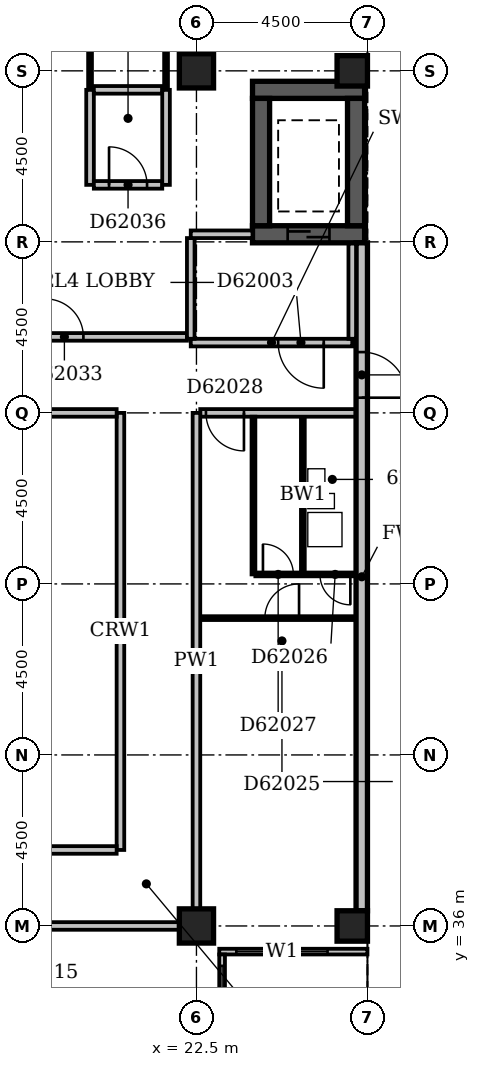
"""IFC4 building model, lengths in metres.
Left out: names, types, materials, properties, quantities, classifications, styles, units other than length and angle.
Written with IfcOpenShell. Run it as: python <this file> out.ifc"""

import sys

from ifc_helpers import new_model, si_unit, direction, frame, frame_2d, origin, origin_2d, place, context, subcontext, project, spatial, rectangle, extrude, element, fill, save


model = new_model("IFC4")
c1 = context("Model", 3, precision=1e-05, world=origin(), true_north=direction((0.0, 1.0)))
c2 = subcontext(c1, "Body", "Model", "MODEL_VIEW")
j1 = project(units=[si_unit("LENGTHUNIT", "METRE"), si_unit("PLANEANGLEUNIT", "RADIAN")], contexts=[c1])
p1 = place(None, origin())
s1 = spatial("IfcSite", under=j1, at=p1, CompositionType="ELEMENT")
p2 = place(p1, origin())
s2 = spatial("IfcBuilding", under=s1, at=p2, CompositionType="ELEMENT")
p3 = place(p2, frame((0.0, 0.0, 240.2)))
s3 = spatial("IfcBuildingStorey", under=s2, at=p3, CompositionType="ELEMENT", Elevation=240.2)
p4 = place(p3, frame((23.975, 54.2, -0.3), z_axis=(0.0, 0.0, 1.0), x_axis=(1.0, 0.0, 0.0)))
e1 = element("IfcWall", 1, at=p4, inside=s3, PredefinedType="SHEAR", context=c2, shape_type="SweptSolid", body=[
    extrude(rectangle(XDim=2.95, YDim=0.45, at=frame_2d((1.475, 0.0))), origin(), (0.0, 0.0, 1.0), 3.6),
])
p5 = place(p4, frame((0.925, 0.0, 0.3)))
e2 = element("IfcOpeningElement", 2, at=p5, cuts=e1, PredefinedType="OPENING", context=c2, shape_type="SweptSolid", body=[
    extrude(rectangle(XDim=1.1, YDim=2.1, at=frame_2d((0.55, 1.05))), frame((0.0, 0.237, 0.0), z_axis=(0.0, -1.0, 0.0), x_axis=(1.0, 0.0, 0.0)), (0.0, 0.0, 1.0), 0.474),
])
p6 = place(p3, frame((23.975, 58.0, -0.3), z_axis=(0.0, 0.0, 1.0), x_axis=(1.0, 0.0, 0.0)))
e3 = element("IfcWall", 3, at=p6, inside=s3, PredefinedType="SHEAR", context=c2, shape_type="SweptSolid", body=[
    extrude(rectangle(XDim=2.95, YDim=0.45, at=frame_2d((1.475, 0.0))), origin(), (0.0, 0.0, 1.0), 3.6),
])
for number, where, z_axis, x_axis in (
    (4, (24.2, 54.425, -0.3), (0.0, 0.0, 1.0), (0.0, 1.0, 0.0)),
    (5, (26.7, 54.425, -0.3), (0.0, 0.0, 1.0), (0.0, 1.0, 0.0)),
):
    element("IfcWall", number, at=place(p3, frame(where, z_axis=z_axis, x_axis=x_axis)), inside=s3, PredefinedType="SHEAR", context=c2, shape_type="SweptSolid", body=[
        extrude(rectangle(XDim=3.35, YDim=0.45, at=frame_2d((1.675, 0.0))), origin(), (0.0, 0.0, 1.0), 3.6),
    ])
p7 = place(p3, frame((22.5, 36.0, -0.3), z_axis=(0.0, 0.0, 1.0), x_axis=(1.0, 0.0, 0.0)))
e6 = element("IfcColumn", 6, at=p7, inside=s3, PredefinedType="COLUMN", context=c2, shape_type="SweptSolid", body=[
    extrude(rectangle(XDim=0.9, YDim=0.9, at=origin_2d()), origin(), (0.0, 0.0, 1.0), 3.6),
])
p8 = place(p3, frame((26.6, 36.0, -0.3), z_axis=(0.0, 0.0, 1.0), x_axis=(1.0, 0.0, 0.0)))
e7 = element("IfcColumn", 7, at=p8, inside=s3, PredefinedType="COLUMN", context=c2, shape_type="SweptSolid", body=[
    extrude(rectangle(XDim=0.8, YDim=0.8, at=origin_2d()), origin(), (0.0, 0.0, 1.0), 3.6),
])
p9 = place(p3, frame((22.5, 58.5, -0.3), z_axis=(0.0, 0.0, 1.0), x_axis=(1.0, 0.0, 0.0)))
e8 = element("IfcColumn", 8, at=p9, inside=s3, PredefinedType="COLUMN", context=c2, shape_type="SweptSolid", body=[
    extrude(rectangle(XDim=0.9, YDim=0.9, at=origin_2d()), origin(), (0.0, 0.0, 1.0), 3.6),
])
p10 = place(p3, frame((26.6, 58.5, -0.3), z_axis=(0.0, 0.0, 1.0), x_axis=(1.0, 0.0, 0.0)))
e9 = element("IfcColumn", 9, at=p10, inside=s3, PredefinedType="COLUMN", context=c2, shape_type="SweptSolid", body=[
    extrude(rectangle(XDim=0.8, YDim=0.8, at=origin_2d()), origin(), (0.0, 0.0, 1.0), 3.6),
])
p11 = place(p3, frame((23.175, 17.4, 0.0), z_axis=(0.0, 0.0, 1.0), x_axis=(0.0, 1.0, 0.0)))
e10 = element("IfcWall", 10, at=p11, inside=s3, PredefinedType="STANDARD", context=c2, shape_type="SweptSolid", body=[
    extrude(rectangle(XDim=17.85, YDim=0.15, at=frame_2d((8.925, 0.0))), origin(), (0.0, 0.0, 1.0), 2.7),
])
p12 = place(p11, frame((1.65, 0.0, 0.6)))
e11 = element("IfcOpeningElement", 11, at=p12, cuts=e10, PredefinedType="OPENING", context=c2, shape_type="SweptSolid", body=[
    extrude(rectangle(XDim=2.4, YDim=1.8, at=frame_2d((1.2, 0.9))), frame((0.0, 0.087, 0.0), z_axis=(0.0, -1.0, 0.0), x_axis=(1.0, 0.0, 0.0)), (0.0, 0.0, 1.0), 0.174),
])
p13 = place(p11, frame((7.936, 0.0, 0.6)))
e12 = element("IfcOpeningElement", 12, at=p13, cuts=e10, PredefinedType="OPENING", context=c2, shape_type="SweptSolid", body=[
    extrude(rectangle(XDim=0.9, YDim=1.8, at=frame_2d((0.45, 0.9))), frame((0.0, 0.087, 0.0), z_axis=(0.0, -1.0, 0.0), x_axis=(1.0, 0.0, 0.0)), (0.0, 0.0, 1.0), 0.174),
])
p14 = place(p11, frame((10.65, 0.0, 0.6)))
e13 = element("IfcOpeningElement", 13, at=p14, cuts=e10, PredefinedType="OPENING", context=c2, shape_type="SweptSolid", body=[
    extrude(rectangle(XDim=2.4, YDim=1.8, at=frame_2d((1.2, 0.9))), frame((0.0, 0.087, 0.0), z_axis=(0.0, -1.0, 0.0), x_axis=(1.0, 0.0, 0.0)), (0.0, 0.0, 1.0), 0.174),
])
p15 = place(p11, frame((15.15, 0.0, 0.6)))
e14 = element("IfcOpeningElement", 14, at=p15, cuts=e10, PredefinedType="OPENING", context=c2, shape_type="SweptSolid", body=[
    extrude(rectangle(XDim=2.4, YDim=1.8, at=frame_2d((1.2, 0.9))), frame((0.0, 0.087, 0.0), z_axis=(0.0, -1.0, 0.0), x_axis=(1.0, 0.0, 0.0)), (0.0, 0.0, 1.0), 0.174),
])
p16 = place(p3, frame((23.1, 35.325, 0.0), z_axis=(0.0, 0.0, 1.0), x_axis=(1.0, 0.0, 0.0)))
e15 = element("IfcWall", 15, at=p16, inside=s3, PredefinedType="STANDARD", context=c2, shape_type="SweptSolid", body=[
    extrude(rectangle(XDim=3.9, YDim=0.15, at=frame_2d((1.95, 0.0))), origin(), (0.0, 0.0, 1.0), 2.7),
])
p17 = place(p16, frame((0.45, 0.0, 0.6)))
e16 = element("IfcOpeningElement", 16, at=p17, cuts=e15, PredefinedType="OPENING", context=c2, shape_type="SweptSolid", body=[
    extrude(rectangle(XDim=2.4, YDim=1.8, at=frame_2d((1.2, 0.9))), frame((0.0, 0.087, 0.0), z_axis=(0.0, -1.0, 0.0), x_axis=(1.0, 0.0, 0.0)), (0.0, 0.0, 1.0), 0.174),
])
p18 = place(p3, frame((26.85, 36.4, 0.0), z_axis=(0.0, 0.0, 1.0), x_axis=(0.0, 1.0, 0.0)))
e17 = element("IfcWall", 17, at=p18, inside=s3, PredefinedType="STANDARD", context=c2, shape_type="SweptSolid", body=[
    extrude(rectangle(XDim=17.575, YDim=0.3, at=frame_2d((8.788, 0.0))), origin(), (0.0, 0.0, 1.0), 3.3),
])
p19 = place(p18, frame((13.5, 0.0, 0.0)))
e18 = element("IfcOpeningElement", 18, at=p19, cuts=e17, PredefinedType="OPENING", context=c2, shape_type="SweptSolid", body=[
    extrude(rectangle(XDim=1.2, YDim=2.4, at=frame_2d((0.6, 1.2))), frame((0.0, 0.162, 0.0), z_axis=(0.0, -1.0, 0.0), x_axis=(1.0, 0.0, 0.0)), (0.0, 0.0, 1.0), 0.324),
])
p20 = place(p3, frame((22.35, 51.35, 0.0), z_axis=(0.0, 0.0, 1.0), x_axis=(1.0, 0.0, 0.0)))
e19 = element("IfcWall", 19, at=p20, inside=s3, PredefinedType="PARTITIONING", context=c2, shape_type="SweptSolid", body=[
    extrude(rectangle(XDim=4.25, YDim=0.2, at=frame_2d((2.125, 0.0))), origin(), (0.0, 0.0, 1.0), 3.3),
])
p21 = place(p20, frame((2.3, 0.0, 0.0)))
e20 = element("IfcOpeningElement", 20, at=p21, cuts=e19, PredefinedType="OPENING", context=c2, shape_type="SweptSolid", body=[
    extrude(rectangle(XDim=1.2, YDim=2.1, at=frame_2d((0.6, 1.05))), frame((0.0, 0.112, 0.0), z_axis=(0.0, -1.0, 0.0), x_axis=(1.0, 0.0, 0.0)), (0.0, 0.0, 1.0), 0.224),
])
p22 = place(p3, frame((26.6, 51.45, 0.0), z_axis=(0.0, 0.0, 1.0), x_axis=(0.0, 1.0, 0.0)))
e21 = element("IfcWall", 21, at=p22, inside=s3, PredefinedType="PARTITIONING", context=c2, shape_type="SweptSolid", body=[
    extrude(rectangle(XDim=2.505, YDim=0.2, at=frame_2d((1.252, 0.0))), origin(), (0.0, 0.0, 1.0), 3.3),
])
p23 = place(p3, frame((22.35, 54.2, 0.0), z_axis=(0.0, 0.0, 1.0), x_axis=(1.0, 0.0, 0.0)))
e22 = element("IfcWall", 22, at=p23, inside=s3, PredefinedType="PARTITIONING", context=c2, shape_type="SweptSolid", body=[
    extrude(rectangle(XDim=1.625, YDim=0.2, at=frame_2d((0.812, 0.0))), origin(), (0.0, 0.0, 1.0), 3.3),
])
p24 = place(p3, frame((22.35, 51.45, 0.0), z_axis=(0.0, 0.0, 1.0), x_axis=(0.0, 1.0, 0.0)))
e23 = element("IfcWall", 23, at=p24, inside=s3, PredefinedType="PARTITIONING", context=c2, shape_type="SweptSolid", body=[
    extrude(rectangle(XDim=2.65, YDim=0.2, at=frame_2d((1.325, 0.0))), origin(), (0.0, 0.0, 1.0), 3.3),
])
p25 = place(p3, frame((9.1, 36.0, 0.0), z_axis=(0.0, 0.0, 1.0), x_axis=(1.0, 0.0, 0.0)))
e24 = element("IfcWall", 24, at=p25, inside=s3, PredefinedType="PARTITIONING", context=c2, shape_type="SweptSolid", body=[
    extrude(rectangle(XDim=12.95, YDim=0.2, at=frame_2d((6.475, 0.0))), origin(), (0.0, 0.0, 1.0), 3.3),
])
p26 = place(p3, frame((22.5, 36.45, 0.0), z_axis=(0.0, 0.0, 1.0), x_axis=(0.0, 1.0, 0.0)))
e25 = element("IfcWall", 25, at=p26, inside=s3, PredefinedType="PARTITIONING", context=c2, shape_type="SweptSolid", body=[
    extrude(rectangle(XDim=13.05, YDim=0.2, at=frame_2d((6.525, 0.0))), origin(), (0.0, 0.0, 1.0), 3.3),
])
p27 = place(p3, frame((9.1, 38.0, 0.0), z_axis=(0.0, 0.0, 1.0), x_axis=(1.0, 0.0, 0.0)))
e26 = element("IfcWall", 26, at=p27, inside=s3, PredefinedType="PARTITIONING", context=c2, shape_type="SweptSolid", body=[
    extrude(rectangle(XDim=11.3, YDim=0.2, at=frame_2d((5.65, 0.0))), origin(), (0.0, 0.0, 1.0), 3.3),
])
p28 = place(p3, frame((20.5, 38.0, 0.0), z_axis=(0.0, 0.0, 1.0), x_axis=(0.0, 1.0, 0.0)))
e27 = element("IfcWall", 27, at=p28, inside=s3, PredefinedType="PARTITIONING", context=c2, shape_type="SweptSolid", body=[
    extrude(rectangle(XDim=11.5, YDim=0.2, at=frame_2d((5.75, 0.0))), origin(), (0.0, 0.0, 1.0), 3.3),
])
p29 = place(p3, frame((22.6, 44.1, 0.0), z_axis=(0.0, 0.0, 1.0), x_axis=(1.0, 0.0, 0.0)))
e28 = element("IfcWall", 28, at=p29, inside=s3, PredefinedType="PARTITIONING", context=c2, shape_type="SweptSolid", body=[
    extrude(rectangle(XDim=4.4, YDim=0.1, at=frame_2d((2.2, 0.0))), origin(), (0.0, 0.0, 1.0), 3.3),
])
p30 = place(p29, frame((1.7, 0.0, 0.0)))
e29 = element("IfcOpeningElement", 29, at=p30, cuts=e28, PredefinedType="OPENING", context=c2, shape_type="SweptSolid", body=[
    extrude(rectangle(XDim=0.9, YDim=2.1, at=frame_2d((0.45, 1.05))), frame((0.0, 0.062, 0.0), z_axis=(0.0, -1.0, 0.0), x_axis=(1.0, 0.0, 0.0)), (0.0, 0.0, 1.0), 0.124),
])
p31 = place(p3, frame((24.0, 45.25, 0.0), z_axis=(0.0, 0.0, 1.0), x_axis=(0.0, 1.0, 0.0)))
e30 = element("IfcWall", 30, at=p31, inside=s3, PredefinedType="PARTITIONING", context=c2, shape_type="SweptSolid", body=[
    extrude(rectangle(XDim=4.15, YDim=0.1, at=frame_2d((2.075, 0.0))), origin(), (0.0, 0.0, 1.0), 3.3),
])
p32 = place(p3, frame((24.05, 45.25, 0.0), z_axis=(0.0, 0.0, 1.0), x_axis=(1.0, 0.0, 0.0)))
e31 = element("IfcWall", 31, at=p32, inside=s3, PredefinedType="PARTITIONING", context=c2, shape_type="SweptSolid", body=[
    extrude(rectangle(XDim=2.95, YDim=0.1, at=frame_2d((1.475, 0.0))), origin(), (0.0, 0.0, 1.0), 3.3),
])
p33 = place(p32, frame((1.7, 0.0, 0.0)))
e32 = element("IfcOpeningElement", 32, at=p33, cuts=e31, PredefinedType="OPENING", context=c2, shape_type="SweptSolid", body=[
    extrude(rectangle(XDim=0.8, YDim=2.1, at=frame_2d((0.4, 1.05))), frame((0.0, 0.062, 0.0), z_axis=(0.0, -1.0, 0.0), x_axis=(1.0, 0.0, 0.0)), (0.0, 0.0, 1.0), 0.124),
])
p34 = place(p32, frame((0.2, 0.0, 0.0)))
e33 = element("IfcOpeningElement", 33, at=p34, cuts=e31, PredefinedType="OPENING", context=c2, shape_type="SweptSolid", body=[
    extrude(rectangle(XDim=0.8, YDim=2.1, at=frame_2d((0.4, 1.05))), frame((0.0, 0.062, 0.0), z_axis=(0.0, -1.0, 0.0), x_axis=(1.0, 0.0, 0.0)), (0.0, 0.0, 1.0), 0.124),
])
p35 = place(p3, frame((25.3, 45.3, 0.0), z_axis=(0.0, 0.0, 1.0), x_axis=(0.0, 1.0, 0.0)))
e34 = element("IfcWall", 34, at=p35, inside=s3, PredefinedType="PLUMBINGWALL", context=c2, shape_type="SweptSolid", body=[
    extrude(rectangle(XDim=4.1, YDim=0.1, at=frame_2d((2.05, 0.0))), origin(), (0.0, 0.0, 1.0), 3.3),
])
p36 = place(p3, frame((9.1, 49.5, 0.0), z_axis=(0.0, 0.0, 1.0), x_axis=(1.0, 0.0, 0.0)))
e35 = element("IfcWall", 35, at=p36, inside=s3, PredefinedType="PARTITIONING", context=c2, shape_type="SweptSolid", body=[
    extrude(rectangle(XDim=11.3, YDim=0.2, at=frame_2d((5.65, 0.0))), origin(), (0.0, 0.0, 1.0), 3.3),
])
p37 = place(p3, frame((22.6, 49.5, 0.0), z_axis=(0.0, 0.0, 1.0), x_axis=(1.0, 0.0, 0.0)))
e36 = element("IfcWall", 36, at=p37, inside=s3, PredefinedType="PARTITIONING", context=c2, shape_type="SweptSolid", body=[
    extrude(rectangle(XDim=4.4, YDim=0.2, at=frame_2d((2.2, 0.0))), origin(), (0.0, 0.0, 1.0), 3.3),
])
p38 = place(p37, frame((0.15, 0.0, 0.0)))
e37 = element("IfcOpeningElement", 37, at=p38, cuts=e36, PredefinedType="OPENING", context=c2, shape_type="SweptSolid", body=[
    extrude(rectangle(XDim=1.0, YDim=2.1, at=frame_2d((0.5, 1.05))), frame((0.0, 0.112, 0.0), z_axis=(0.0, -1.0, 0.0), x_axis=(1.0, 0.0, 0.0)), (0.0, 0.0, 1.0), 0.224),
])
p39 = place(p3, frame((7.6, 51.5, 0.0), z_axis=(0.0, 0.0, 1.0), x_axis=(1.0, 0.0, 0.0)))
e38 = element("IfcWall", 38, at=p39, inside=s3, PredefinedType="PARTITIONING", context=c2, shape_type="SweptSolid", body=[
    extrude(rectangle(XDim=14.65, YDim=0.2, at=frame_2d((7.325, 0.0))), origin(), (0.0, 0.0, 1.0), 3.3),
])
p40 = place(p39, frame((3.55, 0.0, 0.0)))
e39 = element("IfcOpeningElement", 39, at=p40, cuts=e38, PredefinedType="OPENING", context=c2, shape_type="SweptSolid", body=[
    extrude(rectangle(XDim=0.9, YDim=2.1, at=frame_2d((0.45, 1.05))), frame((0.0, 0.112, 0.0), z_axis=(0.0, -1.0, 0.0), x_axis=(1.0, 0.0, 0.0)), (0.0, 0.0, 1.0), 0.224),
])
p41 = place(p39, frame((10.925, 0.0, 0.0)))
e40 = element("IfcOpeningElement", 40, at=p41, cuts=e38, PredefinedType="OPENING", context=c2, shape_type="SweptSolid", body=[
    extrude(rectangle(XDim=1.0, YDim=2.1, at=frame_2d((0.5, 1.05))), frame((0.0, 0.112, 0.0), z_axis=(0.0, -1.0, 0.0), x_axis=(1.0, 0.0, 0.0)), (0.0, 0.0, 1.0), 0.224),
])
p42 = place(p3, frame((19.7, 55.5, 0.0), z_axis=(0.0, 0.0, 1.0), x_axis=(0.0, 1.0, 0.0)))
e41 = element("IfcWall", 41, at=p42, inside=s3, PredefinedType="PARTITIONING", context=c2, shape_type="SweptSolid", body=[
    extrude(rectangle(XDim=2.5, YDim=0.2, at=frame_2d((1.25, 0.0))), origin(), (0.0, 0.0, 1.0), 3.3),
])
p43 = place(p3, frame((19.8, 55.5, 0.0), z_axis=(0.0, 0.0, 1.0), x_axis=(1.0, 0.0, 0.0)))
e42 = element("IfcWall", 42, at=p43, inside=s3, PredefinedType="PARTITIONING", context=c2, shape_type="SweptSolid", body=[
    extrude(rectangle(XDim=1.8, YDim=0.2, at=frame_2d((0.9, 0.0))), origin(), (0.0, 0.0, 1.0), 3.3),
])
p44 = place(p43, frame((0.4, 0.0, 0.0)))
e43 = element("IfcOpeningElement", 43, at=p44, cuts=e42, PredefinedType="OPENING", context=c2, shape_type="SweptSolid", body=[
    extrude(rectangle(XDim=1.0, YDim=2.1, at=frame_2d((0.5, 1.05))), frame((0.0, 0.112, 0.0), z_axis=(0.0, -1.0, 0.0), x_axis=(1.0, 0.0, 0.0)), (0.0, 0.0, 1.0), 0.224),
])
p45 = place(p3, frame((21.7, 55.5, 0.0), z_axis=(0.0, 0.0, 1.0), x_axis=(0.0, 1.0, 0.0)))
e44 = element("IfcWall", 44, at=p45, inside=s3, PredefinedType="PARTITIONING", context=c2, shape_type="SweptSolid", body=[
    extrude(rectangle(XDim=2.5, YDim=0.2, at=frame_2d((1.25, 0.0))), origin(), (0.0, 0.0, 1.0), 3.3),
])
p46 = place(p3, frame((19.7, 58.0, 0.0), z_axis=(0.0, 0.0, 1.0), x_axis=(0.0, 1.0, 0.0)))
e45 = element("IfcWall", 45, at=p46, inside=s3, PredefinedType="PARTITIONING", context=c2, shape_type="SweptSolid", body=[
    extrude(rectangle(XDim=1.1, YDim=0.1, at=frame_2d((0.55, 0.0))), origin(), (0.0, 0.0, 1.0), 3.3),
])
p47 = place(p3, frame((19.8, 58.0, 0.0), z_axis=(0.0, 0.0, 1.0), x_axis=(1.0, 0.0, 0.0)))
e46 = element("IfcWall", 46, at=p47, inside=s3, PredefinedType="PARTITIONING", context=c2, shape_type="SweptSolid", body=[
    extrude(rectangle(XDim=1.8, YDim=0.2, at=frame_2d((0.9, 0.0))), origin(), (0.0, 0.0, 1.0), 3.3),
])
p48 = place(p3, frame((21.7, 58.0, 0.0), z_axis=(0.0, 0.0, 1.0), x_axis=(0.0, 1.0, 0.0)))
e47 = element("IfcWall", 47, at=p48, inside=s3, PredefinedType="PARTITIONING", context=c2, shape_type="SweptSolid", body=[
    extrude(rectangle(XDim=1.1, YDim=0.1, at=frame_2d((0.55, 0.0))), origin(), (0.0, 0.0, 1.0), 3.3),
])
p49 = place(p15, origin())
e48 = element("IfcWindow", 48, at=p49, inside=s3, PartitioningType="SINGLE_PANEL", PredefinedType="WINDOW", context=c2, shape_type="SweptSolid", body=[
    extrude(rectangle(XDim=2.4, YDim=1.8, at=frame_2d((1.2, 0.9))), frame((0.0, 0.03, 0.0), z_axis=(0.0, -1.0, 0.0), x_axis=(1.0, 0.0, 0.0)), (0.0, 0.0, 1.0), 0.06),
])
fill(e14, e48)
p50 = place(p17, origin())
e49 = element("IfcWindow", 49, at=p50, inside=s3, PartitioningType="SINGLE_PANEL", PredefinedType="WINDOW", context=c2, shape_type="SweptSolid", body=[
    extrude(rectangle(XDim=2.4, YDim=1.8, at=frame_2d((1.2, 0.9))), frame((0.0, 0.03, 0.0), z_axis=(0.0, -1.0, 0.0), x_axis=(1.0, 0.0, 0.0)), (0.0, 0.0, 1.0), 0.06),
])
fill(e16, e49)
p51 = place(p19, origin())
e50 = element("IfcDoor", 50, at=p51, inside=s3, OperationType="DOUBLE_DOOR_SINGLE_SWING", PredefinedType="DOOR", context=c2, shape_type="SweptSolid", body=[
    extrude(rectangle(XDim=1.2, YDim=2.4, at=frame_2d((0.6, 1.2))), frame((0.0, 0.025, 0.0), z_axis=(0.0, -1.0, 0.0), x_axis=(1.0, 0.0, 0.0)), (0.0, 0.0, 1.0), 0.05),
])
fill(e18, e50)
p52 = place(p21, origin())
e51 = element("IfcDoor", 51, at=p52, inside=s3, OperationType="SINGLE_SWING_RIGHT", PredefinedType="DOOR", context=c2, shape_type="SweptSolid", body=[
    extrude(rectangle(XDim=1.2, YDim=2.1, at=frame_2d((0.6, 1.05))), frame((0.0, 0.025, 0.0), z_axis=(0.0, -1.0, 0.0), x_axis=(1.0, 0.0, 0.0)), (0.0, 0.0, 1.0), 0.05),
])
fill(e20, e51)
p53 = place(p5, origin())
e52 = element("IfcDoor", 52, at=p53, inside=s3, OperationType="SLIDING_TO_LEFT", PredefinedType="DOOR", context=c2, shape_type="SweptSolid", body=[
    extrude(rectangle(XDim=1.1, YDim=2.1, at=frame_2d((0.55, 1.05))), frame((0.0, 0.025, 0.0), z_axis=(0.0, -1.0, 0.0), x_axis=(1.0, 0.0, 0.0)), (0.0, 0.0, 1.0), 0.05),
])
fill(e2, e52)
p54 = place(p30, frame((0.9, 0.0, 0.0), z_axis=(0.0, 0.0, 1.0), x_axis=(-1.0, 0.0, 0.0)))
e53 = element("IfcDoor", 53, at=p54, inside=s3, OperationType="SINGLE_SWING_LEFT", PredefinedType="DOOR", context=c2, shape_type="SweptSolid", body=[
    extrude(rectangle(XDim=0.9, YDim=2.1, at=frame_2d((0.45, 1.05))), frame((0.0, 0.025, 0.0), z_axis=(0.0, -1.0, 0.0), x_axis=(1.0, 0.0, 0.0)), (0.0, 0.0, 1.0), 0.05),
])
fill(e29, e53)
p55 = place(p33, origin())
e54 = element("IfcDoor", 54, at=p55, inside=s3, OperationType="SINGLE_SWING_RIGHT", PredefinedType="DOOR", context=c2, shape_type="SweptSolid", body=[
    extrude(rectangle(XDim=0.8, YDim=2.1, at=frame_2d((0.4, 1.05))), frame((0.0, 0.025, 0.0), z_axis=(0.0, -1.0, 0.0), x_axis=(1.0, 0.0, 0.0)), (0.0, 0.0, 1.0), 0.05),
])
fill(e32, e54)
p56 = place(p34, origin())
e55 = element("IfcDoor", 55, at=p56, inside=s3, OperationType="SINGLE_SWING_LEFT", PredefinedType="DOOR", context=c2, shape_type="SweptSolid", body=[
    extrude(rectangle(XDim=0.8, YDim=2.1, at=frame_2d((0.4, 1.05))), frame((0.0, 0.025, 0.0), z_axis=(0.0, -1.0, 0.0), x_axis=(1.0, 0.0, 0.0)), (0.0, 0.0, 1.0), 0.05),
])
fill(e33, e55)
p57 = place(p38, origin())
e56 = element("IfcDoor", 56, at=p57, inside=s3, OperationType="SINGLE_SWING_RIGHT", PredefinedType="DOOR", context=c2, shape_type="SweptSolid", body=[
    extrude(rectangle(XDim=1.0, YDim=2.1, at=frame_2d((0.5, 1.05))), frame((0.0, 0.025, 0.0), z_axis=(0.0, -1.0, 0.0), x_axis=(1.0, 0.0, 0.0)), (0.0, 0.0, 1.0), 0.05),
])
fill(e37, e56)
p58 = place(p41, origin())
e57 = element("IfcDoor", 57, at=p58, inside=s3, OperationType="SINGLE_SWING_LEFT", PredefinedType="DOOR", context=c2, shape_type="SweptSolid", body=[
    extrude(rectangle(XDim=1.0, YDim=2.1, at=frame_2d((0.5, 1.05))), frame((0.0, 0.025, 0.0), z_axis=(0.0, -1.0, 0.0), x_axis=(1.0, 0.0, 0.0)), (0.0, 0.0, 1.0), 0.05),
])
fill(e40, e57)
p59 = place(p44, origin())
e58 = element("IfcDoor", 58, at=p59, inside=s3, OperationType="SINGLE_SWING_LEFT", PredefinedType="DOOR", context=c2, shape_type="SweptSolid", body=[
    extrude(rectangle(XDim=1.0, YDim=2.1, at=frame_2d((0.5, 1.05))), frame((0.0, 0.025, 0.0), z_axis=(0.0, -1.0, 0.0), x_axis=(1.0, 0.0, 0.0)), (0.0, 0.0, 1.0), 0.05),
])
fill(e43, e58)
save(model, sys.argv[1])
